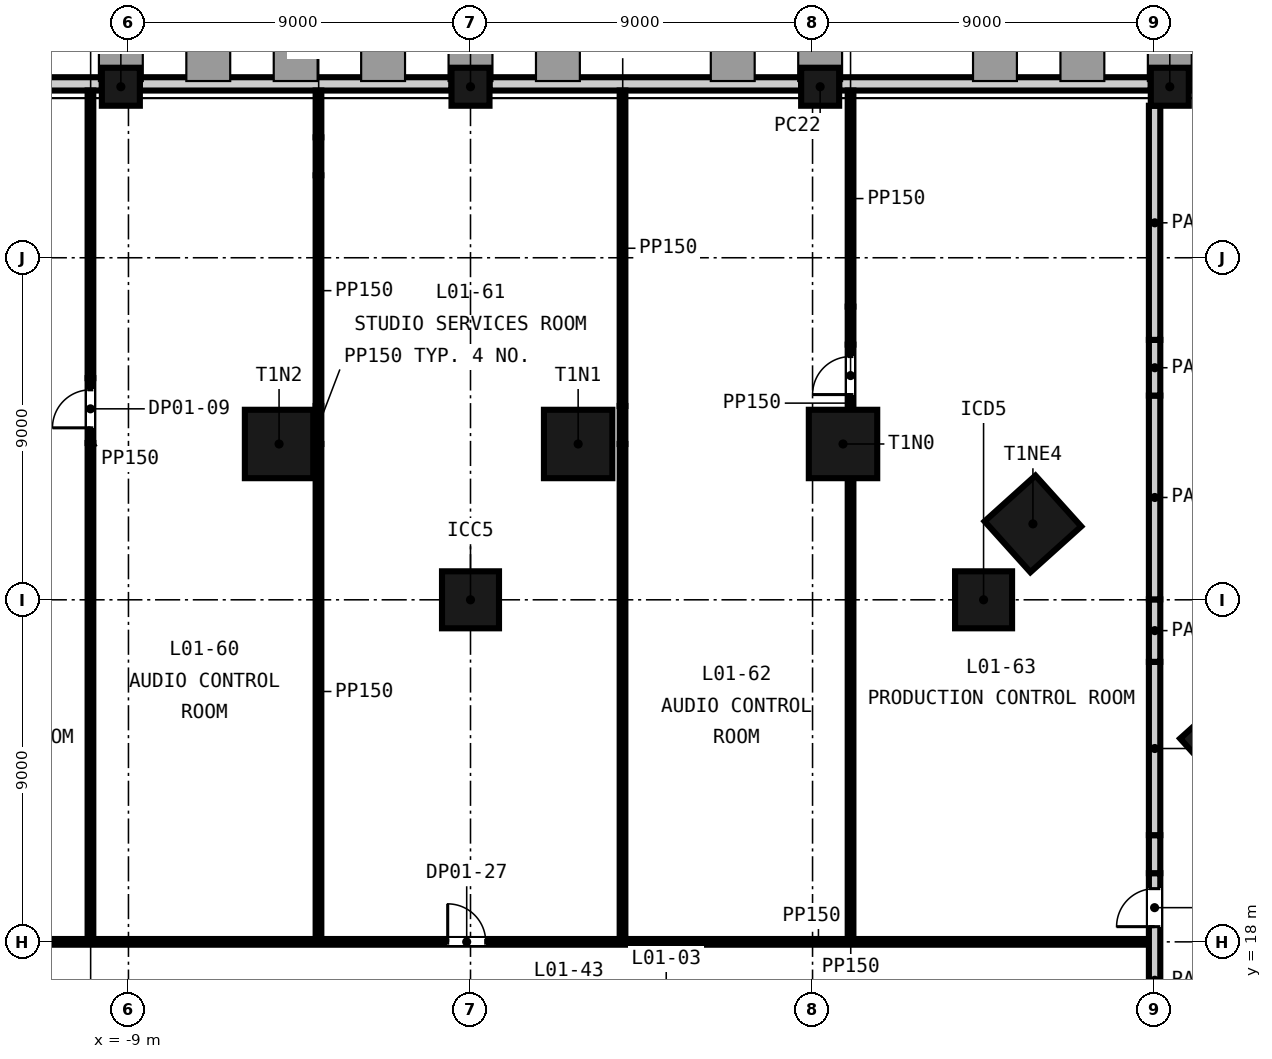
"""IFC4 building model, lengths in metres.
Left out: names, types, materials, properties, quantities, classifications, styles, units other than length and angle.
Written with IfcOpenShell. Run it as: python <this file> out.ifc"""

import sys

from ifc_helpers import new_model, si_unit, direction, frame, frame_2d, origin, origin_2d, place, context, subcontext, project, spatial, rectangle, extrude, element, fill, save


model = new_model("IFC4")
c1 = context("Model", 3, precision=1e-05, world=origin(), true_north=direction((0.0, 1.0)))
c2 = subcontext(c1, "Body", "Model", "MODEL_VIEW")
j1 = project(units=[si_unit("LENGTHUNIT", "METRE"), si_unit("PLANEANGLEUNIT", "RADIAN")], contexts=[c1])
p1 = place(None, origin())
s1 = spatial("IfcSite", under=j1, at=p1, CompositionType="ELEMENT")
p2 = place(p1, origin())
s2 = spatial("IfcBuilding", under=s1, at=p2, CompositionType="ELEMENT")
p3 = place(p2, frame((0.0, 0.0, 9.0)))
s3 = spatial("IfcBuildingStorey", under=s2, at=p3, CompositionType="ELEMENT", Elevation=9.0)
for number, where, z_axis, x_axis in (
    (1, (9.802, 31.1, -0.4), (0.0, 0.0, 1.0), (-1.0, 0.0, 0.0)),
    (2, (2.832, 31.1, -0.4), (0.0, 0.0, 1.0), (-1.0, 0.0, 0.0)),
    (3, (-5.037, 31.1, -0.4), (0.0, 0.0, 1.0), (-1.0, 0.0, 0.0)),
    (4, (19.944, 23.283, -0.4), (0.0, 0.0, 1.0), (-0.669, 0.743, 0.0)),
    (5, (14.799, 28.998, -0.4), (0.0, 0.0, 1.0), (-0.669, 0.743, 0.0)),
):
    element("IfcColumn", number, at=place(p3, frame(where, z_axis=z_axis, x_axis=x_axis)), inside=s3, PredefinedType="COLUMN", context=c2, shape_type="SweptSolid", body=[
        extrude(rectangle(XDim=1.8, YDim=1.8, at=origin_2d()), origin(), (0.0, 0.0, 1.0), 9.0),
    ])
for number, where, z_axis, x_axis in (
    (6, (0.0, 27.0, -0.4), (0.0, 0.0, 1.0), (1.0, 0.0, 0.0)),
    (7, (13.5, 27.0, -0.4), (0.0, 0.0, 1.0), (1.0, 0.0, 0.0)),
):
    element("IfcColumn", number, at=place(p3, frame(where, z_axis=z_axis, x_axis=x_axis)), inside=s3, PredefinedType="COLUMN", context=c2, shape_type="SweptSolid", body=[
        extrude(rectangle(XDim=1.5, YDim=1.5, at=origin_2d()), origin(), (0.0, 0.0, 1.0), 9.0),
    ])
for number, where, z_axis, x_axis in (
    (8, (18.4, 40.5, -0.4), (0.0, 0.0, 1.0), (-1.0, 0.0, 0.0)),
    (9, (9.2, 40.5, -0.4), (0.0, 0.0, 1.0), (-1.0, 0.0, 0.0)),
    (10, (0.0, 40.5, -0.4), (0.0, 0.0, 1.0), (-1.0, 0.0, 0.0)),
    (11, (-9.2, 40.5, -0.4), (0.0, 0.0, 1.0), (-1.0, 0.0, 0.0)),
):
    element("IfcColumn", number, at=place(p3, frame(where, z_axis=z_axis, x_axis=x_axis)), inside=s3, PredefinedType="COLUMN", context=c2, shape_type="SweptSolid", body=[
        extrude(rectangle(XDim=1.0, YDim=1.0, at=origin_2d()), origin(), (0.0, 0.0, 1.0), 9.0),
    ])
p4 = place(p3, frame((27.1, 40.575, -0.4), z_axis=(0.0, 0.0, 1.0), x_axis=(-1.0, 0.0, 0.0)))
e12 = element("IfcWall", 12, at=p4, inside=s3, PredefinedType="SOLIDWALL", context=c2, shape_type="SweptSolid", body=[
    extrude(rectangle(XDim=8.2, YDim=0.35, at=frame_2d((4.1, 0.0))), origin(), (0.0, 0.0, 1.0), 8.1),
])
for number, where, z_axis, x_axis in (
    (13, (17.9, 40.575, -0.4), (0.0, 0.0, 1.0), (-1.0, 0.0, 0.0)),
    (14, (8.7, 40.575, -0.4), (0.0, 0.0, 1.0), (-1.0, 0.0, 0.0)),
    (15, (-0.5, 40.575, -0.4), (0.0, 0.0, 1.0), (-1.0, 0.0, 0.0)),
    (16, (-9.7, 40.575, -0.4), (0.0, 0.0, 1.0), (-1.0, 0.0, 0.0)),
):
    element("IfcWall", number, at=place(p3, frame(where, z_axis=z_axis, x_axis=x_axis)), inside=s3, PredefinedType="SOLIDWALL", context=c2, shape_type="SweptSolid", body=[
        extrude(rectangle(XDim=8.2, YDim=0.35, at=frame_2d((4.1, 0.0))), origin(), (0.0, 0.0, 1.0), 8.1),
    ])
p5 = place(p3, frame((-17.85, 18.0, 0.0), z_axis=(0.0, 0.0, 1.0), x_axis=(1.0, 0.0, 0.0)))
e17 = element("IfcWall", 17, at=p5, inside=s3, PredefinedType="PARTITIONING", context=c2, shape_type="SweptSolid", body=[
    extrude(rectangle(XDim=35.7, YDim=0.15, at=frame_2d((17.85, 0.0))), origin(), (0.0, 0.0, 1.0), 8.6),
])
p6 = place(p5, frame((17.25, 0.0, 0.0)))
e18 = element("IfcOpeningElement", 18, at=p6, cuts=e17, PredefinedType="OPENING", context=c2, shape_type="SweptSolid", body=[
    extrude(rectangle(XDim=1.0, YDim=2.1, at=frame_2d((0.5, 1.05))), frame((0.0, 0.085, 0.0), z_axis=(0.0, -1.0, 0.0), x_axis=(1.0, 0.0, 0.0)), (0.0, 0.0, 1.0), 0.17),
])
p7 = place(p3, frame((-10.0, 18.075, 0.0), z_axis=(0.0, 0.0, 1.0), x_axis=(0.0, 1.0, 0.0)))
e19 = element("IfcWall", 19, at=p7, inside=s3, PredefinedType="PARTITIONING", context=c2, shape_type="SweptSolid", body=[
    extrude(rectangle(XDim=13.05, YDim=0.15, at=frame_2d((6.525, 0.0))), origin(), (0.0, 0.0, 1.0), 8.6),
])
p8 = place(p3, frame((-10.0, 31.125, 0.0), z_axis=(0.0, 0.0, 1.0), x_axis=(0.0, 1.0, 0.0)))
e20 = element("IfcWall", 20, at=p8, inside=s3, PredefinedType="PARTITIONING", context=c2, shape_type="SweptSolid", body=[
    extrude(rectangle(XDim=1.708, YDim=0.15, at=frame_2d((0.854, 0.0))), origin(), (0.0, 0.0, 1.0), 7.6),
])
p9 = place(p8, frame((0.4, 0.0, 0.0)))
e21 = element("IfcOpeningElement", 21, at=p9, cuts=e20, PredefinedType="OPENING", context=c2, shape_type="SweptSolid", body=[
    extrude(rectangle(XDim=1.0, YDim=2.1, at=frame_2d((0.5, 1.05))), frame((0.0, 0.085, 0.0), z_axis=(0.0, -1.0, 0.0), x_axis=(1.0, 0.0, 0.0)), (0.0, 0.0, 1.0), 0.17),
])
p10 = place(p3, frame((-10.0, 32.833, 0.0), z_axis=(0.0, 0.0, 1.0), x_axis=(0.0, 1.0, 0.0)))
e22 = element("IfcWall", 22, at=p10, inside=s3, PredefinedType="PARTITIONING", context=c2, shape_type="SweptSolid", body=[
    extrude(rectangle(XDim=7.567, YDim=0.15, at=frame_2d((3.783, 0.0))), origin(), (0.0, 0.0, 1.0), 8.6),
])
p11 = place(p3, frame((-4.0, 18.075, 0.0), z_axis=(0.0, 0.0, 1.0), x_axis=(0.0, 1.0, 0.0)))
e23 = element("IfcWall", 23, at=p11, inside=s3, PredefinedType="PARTITIONING", context=c2, shape_type="SweptSolid", body=[
    extrude(rectangle(XDim=13.025, YDim=0.15, at=frame_2d((6.513, 0.0))), origin(), (0.0, 0.0, 1.0), 8.6),
])
p12 = place(p3, frame((-4.0, 31.1, 0.0), z_axis=(0.0, 0.0, 1.0), x_axis=(0.0, 1.0, 0.0)))
e24 = element("IfcWall", 24, at=p12, inside=s3, PredefinedType="PARTITIONING", context=c2, shape_type="SweptSolid", body=[
    extrude(rectangle(XDim=1.0, YDim=0.15, at=frame_2d((0.5, 0.0))), origin(), (0.0, 0.0, 1.0), 7.6),
])
p13 = place(p3, frame((-4.0, 32.1, 0.0), z_axis=(0.0, 0.0, 1.0), x_axis=(0.0, 1.0, 0.0)))
e25 = element("IfcWall", 25, at=p13, inside=s3, PredefinedType="PARTITIONING", context=c2, shape_type="SweptSolid", body=[
    extrude(rectangle(XDim=6.069, YDim=0.15, at=frame_2d((3.034, 0.0))), origin(), (0.0, 0.0, 1.0), 8.6),
])
p14 = place(p3, frame((-4.0, 38.169, 0.0), z_axis=(0.0, 0.0, 1.0), x_axis=(0.0, 1.0, 0.0)))
e26 = element("IfcWall", 26, at=p14, inside=s3, PredefinedType="PARTITIONING", context=c2, shape_type="SweptSolid", body=[
    extrude(rectangle(XDim=1.0, YDim=0.15, at=frame_2d((0.5, 0.0))), origin(), (0.0, 0.0, 1.0), 7.921),
])
p15 = place(p3, frame((-4.0, 39.169, 0.0), z_axis=(0.0, 0.0, 1.0), x_axis=(0.0, 1.0, 0.0)))
e27 = element("IfcWall", 27, at=p15, inside=s3, PredefinedType="PARTITIONING", context=c2, shape_type="SweptSolid", body=[
    extrude(rectangle(XDim=1.231, YDim=0.15, at=frame_2d((0.615, 0.0))), origin(), (0.0, 0.0, 1.0), 8.6),
])
p16 = place(p3, frame((4.0, 18.075, 0.0), z_axis=(0.0, 0.0, 1.0), x_axis=(0.0, 1.0, 0.0)))
e28 = element("IfcWall", 28, at=p16, inside=s3, PredefinedType="PARTITIONING", context=c2, shape_type="SweptSolid", body=[
    extrude(rectangle(XDim=13.025, YDim=0.15, at=frame_2d((6.513, 0.0))), origin(), (0.0, 0.0, 1.0), 8.6),
])
p17 = place(p3, frame((4.0, 31.1, 0.0), z_axis=(0.0, 0.0, 1.0), x_axis=(0.0, 1.0, 0.0)))
e29 = element("IfcWall", 29, at=p17, inside=s3, PredefinedType="PARTITIONING", context=c2, shape_type="SweptSolid", body=[
    extrude(rectangle(XDim=1.0, YDim=0.15, at=frame_2d((0.5, 0.0))), origin(), (0.0, 0.0, 1.0), 7.6),
])
p18 = place(p3, frame((4.0, 32.1, 0.0), z_axis=(0.0, 0.0, 1.0), x_axis=(0.0, 1.0, 0.0)))
e30 = element("IfcWall", 30, at=p18, inside=s3, PredefinedType="PARTITIONING", context=c2, shape_type="SweptSolid", body=[
    extrude(rectangle(XDim=8.3, YDim=0.15, at=frame_2d((4.15, 0.0))), origin(), (0.0, 0.0, 1.0), 8.6),
])
p19 = place(p3, frame((10.0, 18.075, 0.0), z_axis=(0.0, 0.0, 1.0), x_axis=(0.0, 1.0, 0.0)))
e31 = element("IfcWall", 31, at=p19, inside=s3, PredefinedType="PARTITIONING", context=c2, shape_type="SweptSolid", body=[
    extrude(rectangle(XDim=12.125, YDim=0.15, at=frame_2d((6.062, 0.0))), origin(), (0.0, 0.0, 1.0), 8.6),
])
p20 = place(p3, frame((10.0, 32.0, 0.0), z_axis=(0.0, 0.0, 1.0), x_axis=(0.0, 1.0, 0.0)))
e32 = element("IfcWall", 32, at=p20, inside=s3, PredefinedType="PARTITIONING", context=c2, shape_type="SweptSolid", body=[
    extrude(rectangle(XDim=1.715, YDim=0.15, at=frame_2d((0.857, 0.0))), origin(), (0.0, 0.0, 1.0), 8.6),
])
p21 = place(p20, frame((0.4, 0.0, 0.0)))
e33 = element("IfcOpeningElement", 33, at=p21, cuts=e32, PredefinedType="OPENING", context=c2, shape_type="SweptSolid", body=[
    extrude(rectangle(XDim=1.0, YDim=2.1, at=frame_2d((0.5, 1.05))), frame((0.0, 0.085, 0.0), z_axis=(0.0, -1.0, 0.0), x_axis=(1.0, 0.0, 0.0)), (0.0, 0.0, 1.0), 0.17),
])
p22 = place(p3, frame((10.0, 33.715, 0.0), z_axis=(0.0, 0.0, 1.0), x_axis=(0.0, 1.0, 0.0)))
e34 = element("IfcWall", 34, at=p22, inside=s3, PredefinedType="PARTITIONING", context=c2, shape_type="SweptSolid", body=[
    extrude(rectangle(XDim=1.0, YDim=0.15, at=frame_2d((0.5, 0.0))), origin(), (0.0, 0.0, 1.0), 7.921),
])
p23 = place(p3, frame((10.0, 34.715, 0.0), z_axis=(0.0, 0.0, 1.0), x_axis=(0.0, 1.0, 0.0)))
e35 = element("IfcWall", 35, at=p23, inside=s3, PredefinedType="PARTITIONING", context=c2, shape_type="SweptSolid", body=[
    extrude(rectangle(XDim=5.685, YDim=0.15, at=frame_2d((2.843, 0.0))), origin(), (0.0, 0.0, 1.0), 8.6),
])
p24 = place(p3, frame((18.0, 15.629, 0.0), z_axis=(0.0, 0.0, 1.0), x_axis=(0.0, 1.0, 0.0)))
e36 = element("IfcWall", 36, at=p24, inside=s3, PredefinedType="PARTITIONING", context=c2, shape_type="SweptSolid", body=[
    extrude(rectangle(XDim=4.178, YDim=0.3, at=frame_2d((2.089, 0.0))), origin(), (0.0, 0.0, 1.0), 8.6),
])
p25 = place(p24, frame((2.771, 0.0, 0.0)))
e37 = element("IfcOpeningElement", 37, at=p25, cuts=e36, PredefinedType="OPENING", context=c2, shape_type="SweptSolid", body=[
    extrude(rectangle(XDim=1.0, YDim=2.1, at=frame_2d((0.5, 1.05))), frame((0.0, 0.16, 0.0), z_axis=(0.0, -1.0, 0.0), x_axis=(1.0, 0.0, 0.0)), (0.0, 0.0, 1.0), 0.32),
])
p26 = place(p3, frame((18.0, 19.807, 0.0), z_axis=(0.0, 0.0, 1.0), x_axis=(0.0, 1.0, 0.0)))
e38 = element("IfcWall", 38, at=p26, inside=s3, PredefinedType="PARTITIONING", context=c2, shape_type="SweptSolid", body=[
    extrude(rectangle(XDim=1.0, YDim=0.3, at=frame_2d((0.5, 0.0))), origin(), (0.0, 0.0, 1.0), 7.997),
])
p27 = place(p3, frame((18.0, 20.807, 0.0), z_axis=(0.0, 0.0, 1.0), x_axis=(0.0, 1.0, 0.0)))
e39 = element("IfcWall", 39, at=p27, inside=s3, PredefinedType="PARTITIONING", context=c2, shape_type="SweptSolid", body=[
    extrude(rectangle(XDim=4.56, YDim=0.3, at=frame_2d((2.28, 0.0))), origin(), (0.0, 0.0, 1.0), 8.6),
])
p28 = place(p3, frame((18.0, 25.367, 0.0), z_axis=(0.0, 0.0, 1.0), x_axis=(0.0, 1.0, 0.0)))
e40 = element("IfcWall", 40, at=p28, inside=s3, PredefinedType="PARTITIONING", context=c2, shape_type="SweptSolid", body=[
    extrude(rectangle(XDim=1.644, YDim=0.3, at=frame_2d((0.822, 0.0))), origin(), (0.0, 0.0, 1.0), 7.6),
])
p29 = place(p3, frame((18.0, 27.011, 0.0), z_axis=(0.0, 0.0, 1.0), x_axis=(0.0, 1.0, 0.0)))
e41 = element("IfcWall", 41, at=p29, inside=s3, PredefinedType="PARTITIONING", context=c2, shape_type="SweptSolid", body=[
    extrude(rectangle(XDim=5.362, YDim=0.3, at=frame_2d((2.681, 0.0))), origin(), (0.0, 0.0, 1.0), 8.6),
])
p30 = place(p3, frame((18.0, 32.374, 0.0), z_axis=(0.0, 0.0, 1.0), x_axis=(0.0, 1.0, 0.0)))
e42 = element("IfcWall", 42, at=p30, inside=s3, PredefinedType="PARTITIONING", context=c2, shape_type="SweptSolid", body=[
    extrude(rectangle(XDim=1.465, YDim=0.3, at=frame_2d((0.733, 0.0))), origin(), (0.0, 0.0, 1.0), 7.511),
])
p31 = place(p3, frame((18.0, 33.839, 0.0), z_axis=(0.0, 0.0, 1.0), x_axis=(0.0, 1.0, 0.0)))
e43 = element("IfcWall", 43, at=p31, inside=s3, PredefinedType="PARTITIONING", context=c2, shape_type="SweptSolid", body=[
    extrude(rectangle(XDim=6.161, YDim=0.3, at=frame_2d((3.081, 0.0))), origin(), (0.0, 0.0, 1.0), 8.6),
])
p32 = place(p25, origin())
e44 = element("IfcDoor", 44, at=p32, inside=s3, OperationType="SINGLE_SWING_LEFT", PredefinedType="DOOR", context=c2, shape_type="SweptSolid", body=[
    extrude(rectangle(XDim=1.0, YDim=2.1, at=frame_2d((0.5, 1.05))), frame((0.0, 0.025, 0.0), z_axis=(0.0, -1.0, 0.0), x_axis=(1.0, 0.0, 0.0)), (0.0, 0.0, 1.0), 0.05),
])
fill(e37, e44)
p33 = place(p9, origin())
e45 = element("IfcDoor", 45, at=p33, inside=s3, OperationType="SINGLE_SWING_LEFT", PredefinedType="DOOR", context=c2, shape_type="SweptSolid", body=[
    extrude(rectangle(XDim=1.0, YDim=2.1, at=frame_2d((0.5, 1.05))), frame((0.0, 0.025, 0.0), z_axis=(0.0, -1.0, 0.0), x_axis=(1.0, 0.0, 0.0)), (0.0, 0.0, 1.0), 0.05),
])
fill(e21, e45)
p34 = place(p21, origin())
e46 = element("IfcDoor", 46, at=p34, inside=s3, OperationType="SINGLE_SWING_LEFT", PredefinedType="DOOR", context=c2, shape_type="SweptSolid", body=[
    extrude(rectangle(XDim=1.0, YDim=2.1, at=frame_2d((0.5, 1.05))), frame((0.0, 0.025, 0.0), z_axis=(0.0, -1.0, 0.0), x_axis=(1.0, 0.0, 0.0)), (0.0, 0.0, 1.0), 0.05),
])
fill(e33, e46)
p35 = place(p6, origin())
e47 = element("IfcDoor", 47, at=p35, inside=s3, OperationType="SINGLE_SWING_LEFT", PredefinedType="DOOR", context=c2, shape_type="SweptSolid", body=[
    extrude(rectangle(XDim=1.0, YDim=2.1, at=frame_2d((0.5, 1.05))), frame((0.0, 0.025, 0.0), z_axis=(0.0, -1.0, 0.0), x_axis=(1.0, 0.0, 0.0)), (0.0, 0.0, 1.0), 0.05),
])
fill(e18, e47)
save(model, sys.argv[1])
